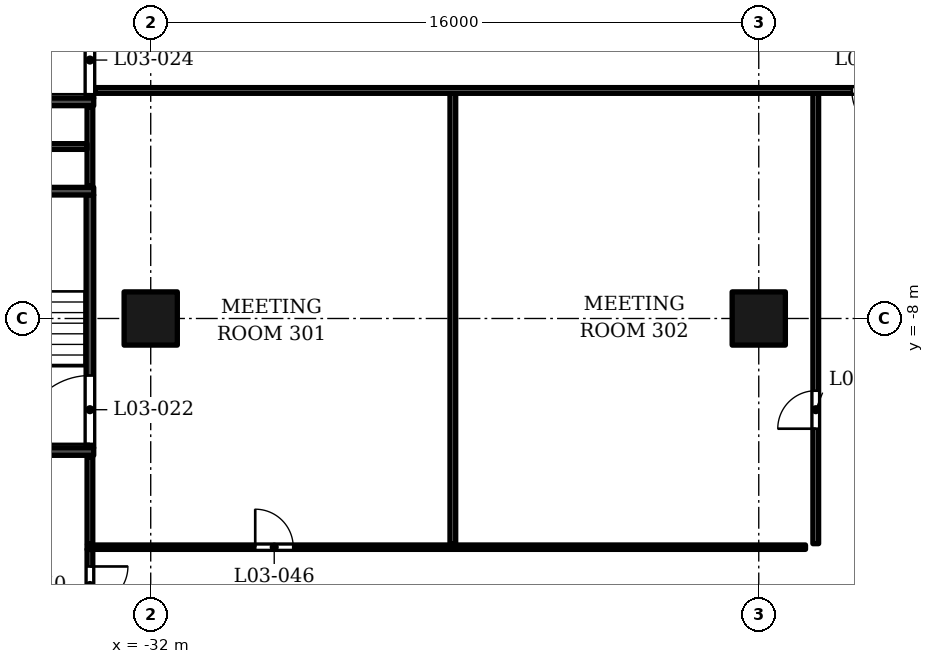
"""IFC4 building model, lengths in metres.
Left out: names, types, materials, properties, quantities, classifications, styles, units other than length and angle.
Written with IfcOpenShell. Run it as: python <this file> out.ifc"""

import sys

from ifc_helpers import new_model, si_unit, direction, frame, frame_2d, origin, origin_2d, place, context, subcontext, project, spatial, rectangle, extrude, element, fill, save


model = new_model("IFC4")
c1 = context("Model", 3, precision=1e-05, world=origin(), true_north=direction((0.0, 1.0)))
c2 = subcontext(c1, "Body", "Model", "MODEL_VIEW")
j1 = project(units=[si_unit("LENGTHUNIT", "METRE"), si_unit("PLANEANGLEUNIT", "RADIAN")], contexts=[c1])
p1 = place(None, origin())
s1 = spatial("IfcSite", under=j1, at=p1, CompositionType="ELEMENT")
p2 = place(p1, origin())
s2 = spatial("IfcBuilding", under=s1, at=p2, CompositionType="ELEMENT")
p3 = place(p2, frame((0.0, 0.0, 29.0)))
s3 = spatial("IfcBuildingStorey", under=s2, at=p3, CompositionType="ELEMENT", Elevation=29.0)
for number, where, z_axis, x_axis in (
    (1, (-32.0, -8.0, 0.0), (0.0, 0.0, 1.0), (1.0, 0.0, 0.0)),
    (2, (-16.0, -8.0, 0.0), (0.0, 0.0, 1.0), (1.0, 0.0, 0.0)),
):
    element("IfcColumn", number, at=place(p3, frame(where, z_axis=z_axis, x_axis=x_axis)), inside=s3, PredefinedType="COLUMN", context=c2, shape_type="SweptSolid", body=[
        extrude(rectangle(XDim=1.4, YDim=1.4, at=origin_2d()), origin(), (0.0, 0.0, 1.0), 5.5),
    ])
for number, where, z_axis, x_axis in (
    (3, (-38.37, -11.5, 0.0), (0.0, 0.0, 1.0), (1.0, 0.0, 0.0)),
    (4, (-38.37, -4.65, 0.0), (0.0, 0.0, 1.0), (1.0, 0.0, 0.0)),
):
    element("IfcWall", number, at=place(p3, frame(where, z_axis=z_axis, x_axis=x_axis)), inside=s3, PredefinedType="SOLIDWALL", context=c2, shape_type="SweptSolid", body=[
        extrude(rectangle(XDim=4.87, YDim=0.2, at=frame_2d((2.435, 0.0))), origin(), (0.0, 0.0, 1.0), 5.05),
    ])
p4 = place(p3, frame((-33.6, -11.4, 0.0), z_axis=(0.0, 0.0, 1.0), x_axis=(0.0, 1.0, 0.0)))
e5 = element("IfcWall", 5, at=p4, inside=s3, PredefinedType="SOLIDWALL", context=c2, shape_type="SweptSolid", body=[
    extrude(rectangle(XDim=6.65, YDim=0.2, at=frame_2d((3.325, 0.0))), origin(), (0.0, 0.0, 1.0), 5.05),
])
p5 = place(p4, frame((0.1, 0.0, 0.0)))
e6 = element("IfcOpeningElement", 6, at=p5, cuts=e5, PredefinedType="OPENING", context=c2, shape_type="SweptSolid", body=[
    extrude(rectangle(XDim=1.8, YDim=2.4, at=frame_2d((0.9, 1.2))), frame((0.0, 0.11, 0.0), z_axis=(0.0, -1.0, 0.0), x_axis=(1.0, 0.0, 0.0)), (0.0, 0.0, 1.0), 0.22),
])
p6 = place(p3, frame((-38.37, -2.3, 0.0), z_axis=(0.0, 0.0, 1.0), x_axis=(1.0, 0.0, 0.0)))
e7 = element("IfcWall", 7, at=p6, inside=s3, PredefinedType="SOLIDWALL", context=c2, shape_type="SweptSolid", body=[
    extrude(rectangle(XDim=4.87, YDim=0.2, at=frame_2d((2.435, 0.0))), origin(), (0.0, 0.0, 1.0), 5.05),
])
p7 = place(p3, frame((-33.6, -2.2, 0.0), z_axis=(0.0, 0.0, 1.0), x_axis=(0.0, 1.0, 0.0)))
e8 = element("IfcWall", 8, at=p7, inside=s3, PredefinedType="SOLIDWALL", context=c2, shape_type="SweptSolid", body=[
    extrude(rectangle(XDim=6.65, YDim=0.2, at=frame_2d((3.325, 0.0))), origin(), (0.0, 0.0, 1.0), 5.05),
])
p8 = place(p7, frame((0.1, 0.0, 0.0)))
e9 = element("IfcOpeningElement", 9, at=p8, cuts=e8, PredefinedType="OPENING", context=c2, shape_type="SweptSolid", body=[
    extrude(rectangle(XDim=1.8, YDim=2.4, at=frame_2d((0.9, 1.2))), frame((0.0, 0.11, 0.0), z_axis=(0.0, -1.0, 0.0), x_axis=(1.0, 0.0, 0.0)), (0.0, 0.0, 1.0), 0.22),
])
p9 = place(p3, frame((-33.6, -16.05, 0.0), z_axis=(0.0, 0.0, 1.0), x_axis=(0.0, 1.0, 0.0)))
e10 = element("IfcWall", 10, at=p9, inside=s3, PredefinedType="PARTITIONING", context=c2, shape_type="SweptSolid", body=[
    extrude(rectangle(XDim=1.975, YDim=0.15, at=frame_2d((0.988, 0.0))), origin(), (0.0, 0.0, 1.0), 5.05),
])
p10 = place(p9, frame((0.525, 0.0, 0.0)))
e11 = element("IfcOpeningElement", 11, at=p10, cuts=e10, PredefinedType="OPENING", context=c2, shape_type="SweptSolid", body=[
    extrude(rectangle(XDim=1.0, YDim=2.1, at=frame_2d((0.5, 1.05))), frame((0.0, 0.085, 0.0), z_axis=(0.0, -1.0, 0.0), x_axis=(1.0, 0.0, 0.0)), (0.0, 0.0, 1.0), 0.17),
])
p11 = place(p3, frame((-33.675, -14.018, 0.0), z_axis=(0.0, 0.0, 1.0), x_axis=(1.0, 0.0, 0.0)))
e12 = element("IfcWall", 12, at=p11, inside=s3, PredefinedType="PARTITIONING", context=c2, shape_type="SweptSolid", body=[
    extrude(rectangle(XDim=18.905, YDim=0.115, at=frame_2d((9.453, 0.0))), origin(), (0.0, 0.0, 1.0), 3.85),
])
p12 = place(p11, frame((4.425, 0.0, 0.0)))
e13 = element("IfcOpeningElement", 13, at=p12, cuts=e12, PredefinedType="OPENING", context=c2, shape_type="SweptSolid", body=[
    extrude(rectangle(XDim=1.0, YDim=2.1, at=frame_2d((0.5, 1.05))), frame((0.0, 0.067, 0.0), z_axis=(0.0, -1.0, 0.0), x_axis=(1.0, 0.0, 0.0)), (0.0, 0.0, 1.0), 0.135),
])
p13 = place(p3, frame((-33.6, -13.925, 0.0), z_axis=(0.0, 0.0, 1.0), x_axis=(0.0, 1.0, 0.0)))
e14 = element("IfcWall", 14, at=p13, inside=s3, PredefinedType="PARTITIONING", context=c2, shape_type="SweptSolid", body=[
    extrude(rectangle(XDim=2.285, YDim=0.15, at=frame_2d((1.143, 0.0))), origin(), (0.0, 0.0, 1.0), 5.05),
])
p14 = place(p3, frame((-24.05, -13.925, 0.0), z_axis=(0.0, 0.0, 1.0), x_axis=(0.0, 1.0, 0.0)))
e15 = element("IfcWall", 15, at=p14, inside=s3, PredefinedType="PARTITIONING", context=c2, shape_type="SweptSolid", body=[
    extrude(rectangle(XDim=11.85, YDim=0.15, at=frame_2d((5.925, 0.0))), origin(), (0.0, 0.0, 1.0), 3.85),
])
p15 = place(p3, frame((-14.5, -13.925, 0.0), z_axis=(0.0, 0.0, 1.0), x_axis=(0.0, 1.0, 0.0)))
e16 = element("IfcWall", 16, at=p15, inside=s3, PredefinedType="PARTITIONING", context=c2, shape_type="SweptSolid", body=[
    extrude(rectangle(XDim=11.85, YDim=0.15, at=frame_2d((5.925, 0.0))), origin(), (0.0, 0.0, 1.0), 3.85),
])
p16 = place(p15, frame((3.025, 0.0, 0.0)))
e17 = element("IfcOpeningElement", 17, at=p16, cuts=e16, PredefinedType="OPENING", context=c2, shape_type="SweptSolid", body=[
    extrude(rectangle(XDim=1.0, YDim=2.1, at=frame_2d((0.5, 1.05))), frame((0.0, 0.085, 0.0), z_axis=(0.0, -1.0, 0.0), x_axis=(1.0, 0.0, 0.0)), (0.0, 0.0, 1.0), 0.17),
])
p17 = place(p3, frame((-33.6, -4.51, 0.0), z_axis=(0.0, 0.0, 1.0), x_axis=(0.0, 1.0, 0.0)))
e18 = element("IfcWall", 18, at=p17, inside=s3, PredefinedType="PARTITIONING", context=c2, shape_type="SweptSolid", body=[
    extrude(rectangle(XDim=2.07, YDim=0.15, at=frame_2d((1.035, 0.0))), origin(), (0.0, 0.0, 1.0), 5.05),
])
p18 = place(p3, frame((-43.72, -3.475, 0.0), z_axis=(0.0, 0.0, 1.0), x_axis=(1.0, 0.0, 0.0)))
e19 = element("IfcWall", 19, at=p18, inside=s3, PredefinedType="PARTITIONING", context=c2, shape_type="SweptSolid", body=[
    extrude(rectangle(XDim=10.045, YDim=0.15, at=frame_2d((5.022, 0.0))), origin(), (0.0, 0.0, 1.0), 4.15),
])
p19 = place(p3, frame((-33.46, -2.0, 0.0), z_axis=(0.0, 0.0, 1.0), x_axis=(1.0, 0.0, 0.0)))
e20 = element("IfcWall", 20, at=p19, inside=s3, PredefinedType="PARTITIONING", context=c2, shape_type="SweptSolid", body=[
    extrude(rectangle(XDim=66.92, YDim=0.15, at=frame_2d((33.46, 0.0))), origin(), (0.0, 0.0, 1.0), 3.85),
])
p20 = place(p19, frame((19.91, 0.0, 0.0)))
e21 = element("IfcOpeningElement", 21, at=p20, cuts=e20, PredefinedType="OPENING", context=c2, shape_type="SweptSolid", body=[
    extrude(rectangle(XDim=1.2, YDim=2.1, at=frame_2d((0.6, 1.05))), frame((0.0, 0.085, 0.0), z_axis=(0.0, -1.0, 0.0), x_axis=(1.0, 0.0, 0.0)), (0.0, 0.0, 1.0), 0.17),
])
p21 = place(p19, frame((45.91, 0.0, 0.0)))
e22 = element("IfcOpeningElement", 22, at=p21, cuts=e20, PredefinedType="OPENING", context=c2, shape_type="SweptSolid", body=[
    extrude(rectangle(XDim=1.2, YDim=2.1, at=frame_2d((0.6, 1.05))), frame((0.0, 0.085, 0.0), z_axis=(0.0, -1.0, 0.0), x_axis=(1.0, 0.0, 0.0)), (0.0, 0.0, 1.0), 0.17),
])
p22 = place(p19, frame((30.11, 0.0, 0.0)))
e23 = element("IfcOpeningElement", 23, at=p22, cuts=e20, PredefinedType="OPENING", context=c2, shape_type="SweptSolid", body=[
    extrude(rectangle(XDim=1.0, YDim=2.1, at=frame_2d((0.5, 1.05))), frame((0.0, 0.085, 0.0), z_axis=(0.0, -1.0, 0.0), x_axis=(1.0, 0.0, 0.0)), (0.0, 0.0, 1.0), 0.17),
])
p23 = place(p19, frame((35.86, 0.0, 0.0)))
e24 = element("IfcOpeningElement", 24, at=p23, cuts=e20, PredefinedType="OPENING", context=c2, shape_type="SweptSolid", body=[
    extrude(rectangle(XDim=1.0, YDim=2.1, at=frame_2d((0.5, 1.05))), frame((0.0, 0.085, 0.0), z_axis=(0.0, -1.0, 0.0), x_axis=(1.0, 0.0, 0.0)), (0.0, 0.0, 1.0), 0.17),
])
p24 = place(p5, origin())
e25 = element("IfcDoor", 25, at=p24, inside=s3, OperationType="DOUBLE_DOOR_SINGLE_SWING", PredefinedType="DOOR", context=c2, shape_type="SweptSolid", body=[
    extrude(rectangle(XDim=1.8, YDim=2.4, at=frame_2d((0.9, 1.2))), frame((0.0, 0.025, 0.0), z_axis=(0.0, -1.0, 0.0), x_axis=(1.0, 0.0, 0.0)), (0.0, 0.0, 1.0), 0.05),
])
fill(e6, e25)
p25 = place(p8, origin())
e26 = element("IfcDoor", 26, at=p25, inside=s3, OperationType="DOUBLE_DOOR_SINGLE_SWING", PredefinedType="DOOR", context=c2, shape_type="SweptSolid", body=[
    extrude(rectangle(XDim=1.8, YDim=2.4, at=frame_2d((0.9, 1.2))), frame((0.0, 0.025, 0.0), z_axis=(0.0, -1.0, 0.0), x_axis=(1.0, 0.0, 0.0)), (0.0, 0.0, 1.0), 0.05),
])
fill(e9, e26)
p26 = place(p20, origin())
e27 = element("IfcDoor", 27, at=p26, inside=s3, OperationType="SINGLE_SWING_RIGHT", PredefinedType="DOOR", context=c2, shape_type="SweptSolid", body=[
    extrude(rectangle(XDim=1.2, YDim=2.1, at=frame_2d((0.6, 1.05))), frame((0.0, 0.025, 0.0), z_axis=(0.0, -1.0, 0.0), x_axis=(1.0, 0.0, 0.0)), (0.0, 0.0, 1.0), 0.05),
])
fill(e21, e27)
p27 = place(p12, origin())
e28 = element("IfcDoor", 28, at=p27, inside=s3, OperationType="SINGLE_SWING_LEFT", PredefinedType="DOOR", context=c2, shape_type="SweptSolid", body=[
    extrude(rectangle(XDim=1.0, YDim=2.1, at=frame_2d((0.5, 1.05))), frame((0.0, 0.025, 0.0), z_axis=(0.0, -1.0, 0.0), x_axis=(1.0, 0.0, 0.0)), (0.0, 0.0, 1.0), 0.05),
])
fill(e13, e28)
p28 = place(p16, origin())
e29 = element("IfcDoor", 29, at=p28, inside=s3, OperationType="SINGLE_SWING_LEFT", PredefinedType="DOOR", context=c2, shape_type="SweptSolid", body=[
    extrude(rectangle(XDim=1.0, YDim=2.1, at=frame_2d((0.5, 1.05))), frame((0.0, 0.025, 0.0), z_axis=(0.0, -1.0, 0.0), x_axis=(1.0, 0.0, 0.0)), (0.0, 0.0, 1.0), 0.05),
])
fill(e17, e29)
p29 = place(p10, origin())
e30 = element("IfcDoor", 30, at=p29, inside=s3, OperationType="SINGLE_SWING_RIGHT", PredefinedType="DOOR", context=c2, shape_type="SweptSolid", body=[
    extrude(rectangle(XDim=1.0, YDim=2.1, at=frame_2d((0.5, 1.05))), frame((0.0, 0.025, 0.0), z_axis=(0.0, -1.0, 0.0), x_axis=(1.0, 0.0, 0.0)), (0.0, 0.0, 1.0), 0.05),
])
fill(e11, e30)
save(model, sys.argv[1])
